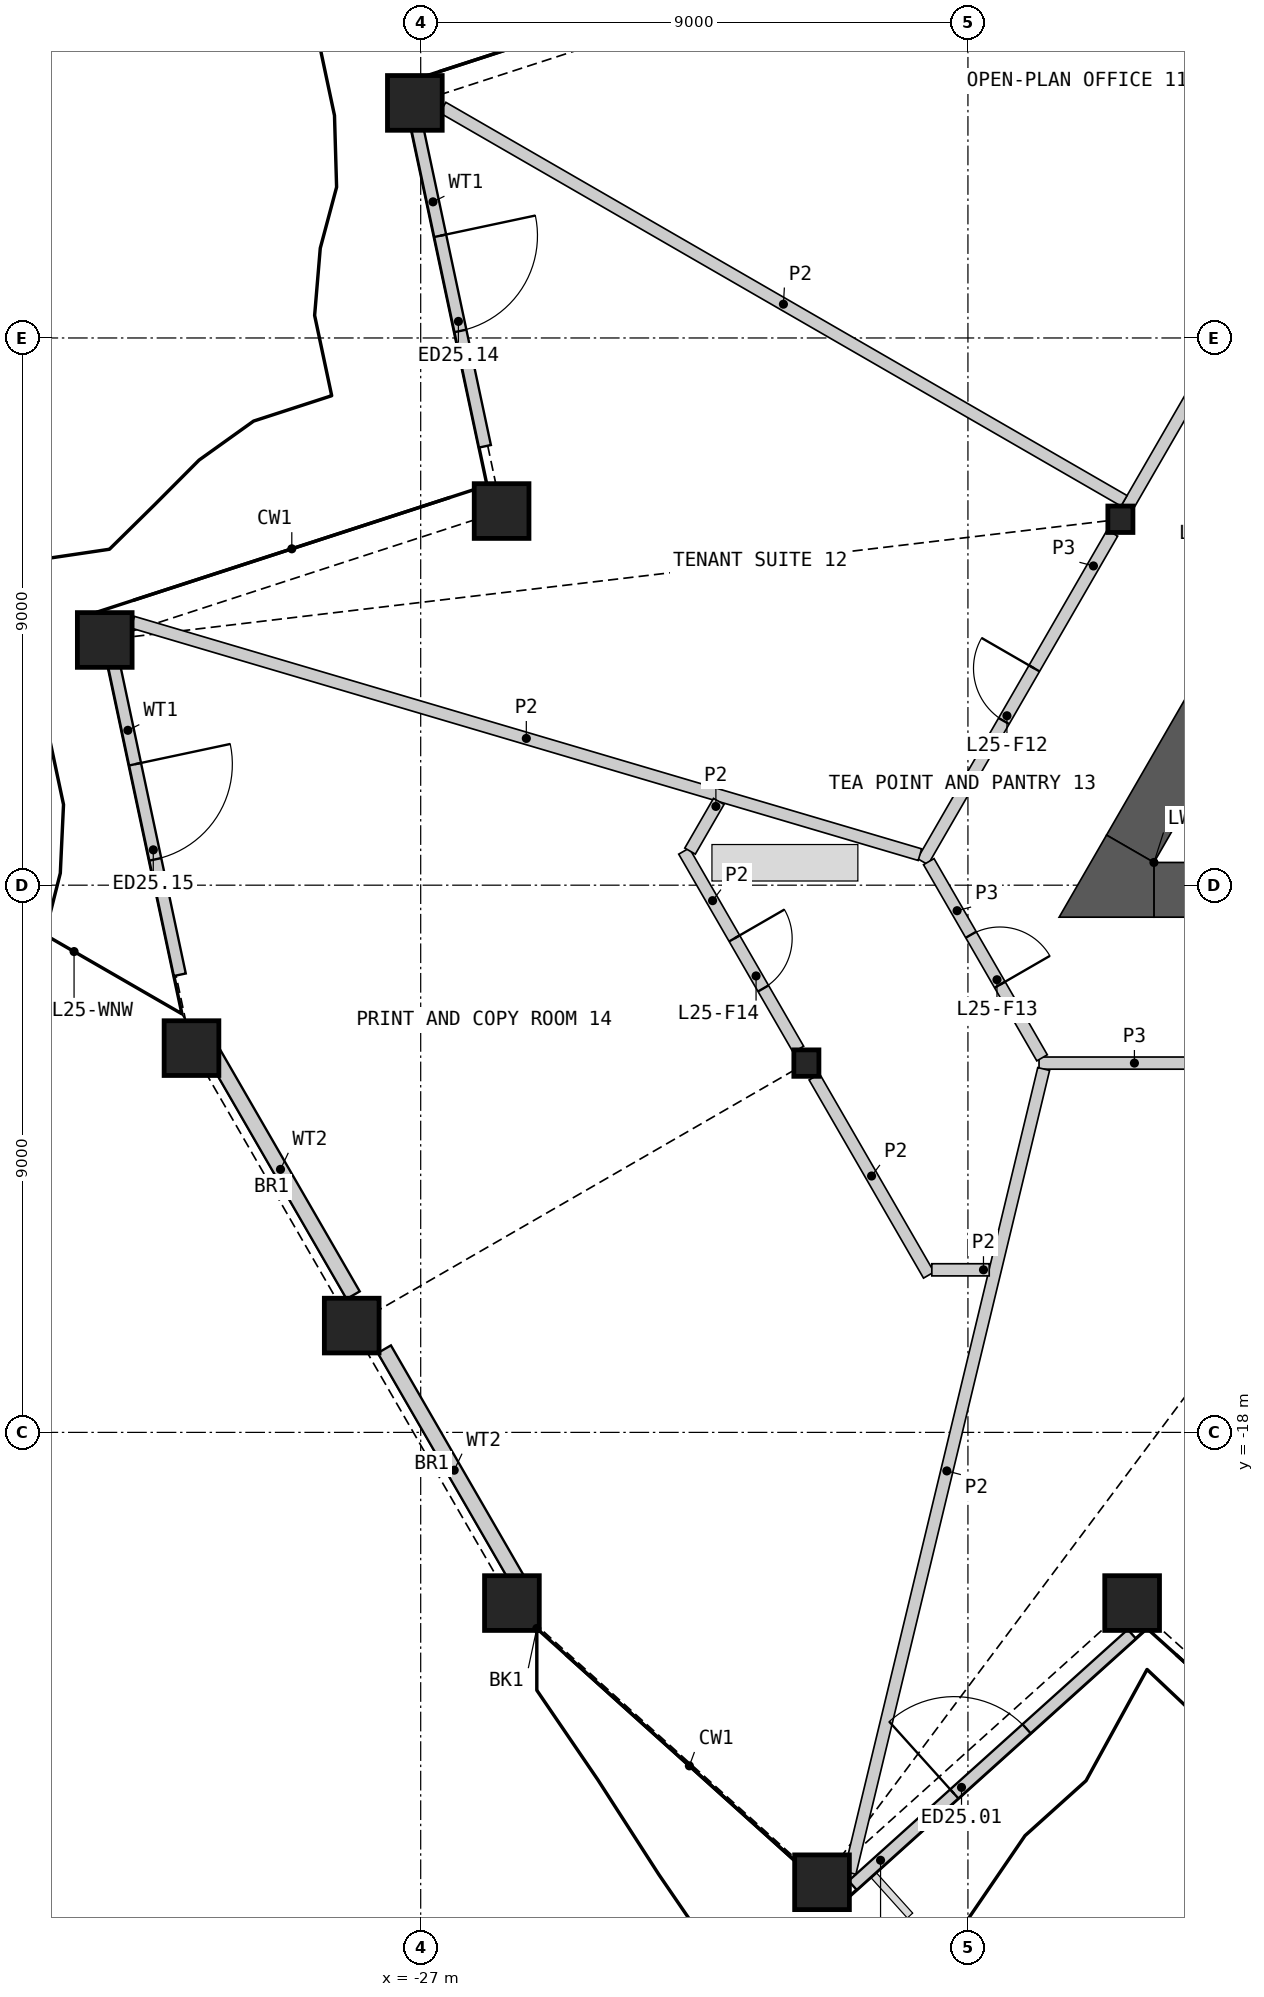
"""IFC4 building model, lengths in metres.
Left out: names, types, materials, properties, quantities, classifications, styles, units other than length and angle.
Written with IfcOpenShell. Run it as: python <this file> out.ifc"""

import sys

from ifc_helpers import new_model, si_unit, direction, frame, frame_2d, origin, origin_2d, place, context, subcontext, project, spatial, polyline, rectangle, hollow_rectangle, i_section, outline, extrude, element, fill, save


model = new_model("IFC4")
c1 = context("Model", 3, precision=1e-05, world=origin(), true_north=direction((0.0, 1.0)))
c2 = subcontext(c1, "Body", "Model", "MODEL_VIEW")
j1 = project(units=[si_unit("LENGTHUNIT", "METRE"), si_unit("PLANEANGLEUNIT", "RADIAN")], contexts=[c1])
p1 = place(None, origin())
s1 = spatial("IfcSite", under=j1, at=p1, CompositionType="ELEMENT")
p2 = place(p1, origin())
s2 = spatial("IfcBuilding", under=s1, at=p2, CompositionType="ELEMENT")
p3 = place(p2, frame((0.0, 0.0, 120.6)))
s3 = spatial("IfcBuildingStorey", under=s2, at=p3, CompositionType="ELEMENT", Elevation=120.6)
for number, where, z_axis, x_axis in (
    (1, (-25.5, -20.807, 0.0), (0.0, 0.0, 1.0), (1.0, 0.0, 0.0)),
    (2, (-20.4, -25.399, 0.0), (0.0, 0.0, 1.0), (1.0, 0.0, 0.0)),
    (3, (-15.3, -20.807, 0.0), (0.0, 0.0, 1.0), (1.0, 0.0, 0.0)),
    (4, (-27.096, 3.866, 0.0), (0.0, 0.0, 1.0), (1.0, 0.0, 0.0)),
    (5, (-25.669, -2.846, 0.0), (0.0, 0.0, 1.0), (1.0, 0.0, 0.0)),
    (6, (-32.196, -4.967, 0.0), (0.0, 0.0, 1.0), (1.0, 0.0, 0.0)),
    (7, (-30.769, -11.68, 0.0), (0.0, 0.0, 1.0), (1.0, 0.0, 0.0)),
    (8, (-28.135, -16.243, 0.0), (0.0, 0.0, 1.0), (1.0, 0.0, 0.0)),
):
    element("IfcColumn", number, at=place(p3, frame(where, z_axis=z_axis, x_axis=x_axis)), inside=s3, PredefinedType="COLUMN", context=c2, shape_type="SweptSolid", body=[
        extrude(hollow_rectangle(XDim=0.9, YDim=0.9, WallThickness=0.06, at=origin_2d()), origin(), (0.0, 0.0, 1.0), 4.2),
    ])
for number, where, z_axis, x_axis in (
    (9, (-15.493, -2.982, 0.0), (0.0, 0.0, 1.0), (1.0, 0.0, 0.0)),
    (10, (-20.657, -11.926, 0.0), (0.0, 0.0, 1.0), (1.0, 0.0, 0.0)),
):
    element("IfcColumn", number, at=place(p3, frame(where, z_axis=z_axis, x_axis=x_axis)), inside=s3, PredefinedType="COLUMN", context=c2, shape_type="SweptSolid", body=[
        extrude(i_section(OverallWidth=0.412, OverallDepth=0.435, WebThickness=0.036, FlangeThickness=0.057, at=origin_2d()), origin(), (0.0, 0.0, 1.0), 4.2),
    ])
p4 = place(p3, frame((-19.896, -25.451, 0.0), z_axis=(0.0, 0.0, 1.0), x_axis=(0.743162487272, 0.669110990428, 0.0)))
e11 = element("IfcWall", 11, at=p4, inside=s3, PredefinedType="SOLIDWALL", context=c2, shape_type="SweptSolid", body=[
    extrude(rectangle(XDim=6.178, YDim=0.2, at=frame_2d((3.089, 0.0))), origin(), (0.0, 0.0, 1.0), 3.189),
])
p5 = place(p4, frame((2.25, 0.0, 0.0)))
e12 = element("IfcOpeningElement", 12, at=p5, cuts=e11, PredefinedType="OPENING", context=c2, shape_type="SweptSolid", body=[
    extrude(rectangle(XDim=1.6, YDim=2.4, at=frame_2d((0.8, 1.2))), frame((0.0, 0.11, 0.0), z_axis=(0.0, -1.0, 0.0), x_axis=(1.0, 0.0, 0.0)), (0.0, 0.0, 1.0), 0.22),
])
p6 = place(p3, frame((-27.083, 3.579, 0.0), z_axis=(0.0, 0.0, 1.0), x_axis=(0.207898180805, -0.978150472278, 0.0)))
e13 = element("IfcWall", 13, at=p6, inside=s3, PredefinedType="SOLIDWALL", context=c2, shape_type="SweptSolid", body=[
    extrude(rectangle(XDim=5.48, YDim=0.2, at=frame_2d((2.74, 0.0))), origin(), (0.0, 0.0, 1.0), 3.189),
])
p7 = place(p6, frame((1.94, 0.0, 0.0)))
e14 = element("IfcOpeningElement", 14, at=p7, cuts=e13, PredefinedType="OPENING", context=c2, shape_type="SweptSolid", body=[
    extrude(rectangle(XDim=1.6, YDim=2.4, at=frame_2d((0.8, 1.2))), frame((0.0, 0.11, 0.0), z_axis=(0.0, -1.0, 0.0), x_axis=(1.0, 0.0, 0.0)), (0.0, 0.0, 1.0), 0.22),
])
p8 = place(p3, frame((-32.101, -5.113, 0.0), z_axis=(0.0, 0.0, 1.0), x_axis=(0.207949862117, -0.978139486395, 0.0)))
e15 = element("IfcWall", 15, at=p8, inside=s3, PredefinedType="SOLIDWALL", context=c2, shape_type="SweptSolid", body=[
    extrude(rectangle(XDim=5.48, YDim=0.2, at=frame_2d((2.74, 0.0))), origin(), (0.0, 0.0, 1.0), 3.189),
])
p9 = place(p8, frame((1.94, 0.0, 0.0)))
e16 = element("IfcOpeningElement", 16, at=p9, cuts=e15, PredefinedType="OPENING", context=c2, shape_type="SweptSolid", body=[
    extrude(rectangle(XDim=1.6, YDim=2.4, at=frame_2d((0.8, 1.2))), frame((0.0, 0.11, 0.0), z_axis=(0.0, -1.0, 0.0), x_axis=(1.0, 0.0, 0.0)), (0.0, 0.0, 1.0), 0.22),
])
p10 = place(p3, frame((-30.5, -11.604, 0.0), z_axis=(0.0, 0.0, 1.0), x_axis=(0.499984810975, -0.866034172995, 0.0)))
e17 = element("IfcWall", 17, at=p10, inside=s3, PredefinedType="SOLIDWALL", context=c2, shape_type="SweptSolid", body=[
    extrude(rectangle(XDim=4.78, YDim=0.25, at=frame_2d((2.39, 0.0))), origin(), (0.0, 0.0, 1.0), 3.189),
])
p11 = place(p3, frame((-27.598, -16.632, 0.0), z_axis=(0.0, 0.0, 1.0), x_axis=(0.500018268964, -0.866014855936, 0.0)))
e18 = element("IfcWall", 18, at=p11, inside=s3, PredefinedType="SOLIDWALL", context=c2, shape_type="SweptSolid", body=[
    extrude(rectangle(XDim=4.596, YDim=0.25, at=frame_2d((2.298, 0.0))), origin(), (0.0, 0.0, 1.0), 3.189),
])
p12 = place(p3, frame((-14.941, -9.076, 0.0), z_axis=(0.0, 0.0, 1.0), x_axis=(1.0, 0.0, 0.0)))
e19 = element("IfcWall", 19, at=p12, inside=s3, PredefinedType="SHEAR", context=c2, shape_type="SweptSolid", body=[
    extrude(rectangle(XDim=7.649, YDim=0.9, at=frame_2d((3.824, 0.0))), origin(), (0.0, 0.0, 1.0), 3.8),
])
p13 = place(p3, frame((-13.271, -4.833, 0.0), z_axis=(0.0, 0.0, 1.0), x_axis=(-0.499994272862, -0.866028710324, 0.0)))
e20 = element("IfcWall", 20, at=p13, inside=s3, PredefinedType="SHEAR", context=c2, shape_type="SweptSolid", body=[
    extrude(rectangle(XDim=4.121, YDim=0.9, at=frame_2d((2.06, 0.0))), origin(), (0.0, 0.0, 1.0), 3.8),
])
p14 = place(p3, origin())
e21 = element("IfcWall", 21, at=p14, inside=s3, PredefinedType="SHEAR", context=c2, shape_type="SweptSolid", body=[
    extrude(outline(polyline([(-14.941, -8.626), (-14.941, -9.526), (-16.5, -9.526), (-15.721, -8.176), (-14.941, -8.626)])), origin(), (0.0, 0.0, 1.0), 3.8),
])
p15 = place(p3, frame((-15.402, -2.823, 0.0), z_axis=(0.0, 0.0, 1.0), x_axis=(0.500023237168, 0.866011987384, 0.0)))
e22 = element("IfcWall", 22, at=p15, inside=s3, PredefinedType="PARTITIONING", context=c2, shape_type="SweptSolid", body=[
    extrude(rectangle(XDim=9.883, YDim=0.2, at=frame_2d((4.942, 0.0))), origin(), (0.0, 0.0, 1.0), 3.8),
])
p16 = place(p15, frame((4.492, 0.0, 0.0)))
e23 = element("IfcOpeningElement", 23, at=p16, cuts=e22, PredefinedType="OPENING", context=c2, shape_type="SweptSolid", body=[
    extrude(rectangle(XDim=1.0, YDim=2.1, at=frame_2d((0.5, 1.05))), frame((0.0, 0.11, 0.0), z_axis=(0.0, -1.0, 0.0), x_axis=(1.0, 0.0, 0.0)), (0.0, 0.0, 1.0), 0.22),
])
p17 = place(p3, frame((-16.831, -11.926, 0.0), z_axis=(0.0, 0.0, 1.0), x_axis=(1.0, 0.0, 0.0)))
e24 = element("IfcWall", 24, at=p17, inside=s3, PredefinedType="PARTITIONING", context=c2, shape_type="SweptSolid", body=[
    extrude(rectangle(XDim=6.275, YDim=0.2, at=frame_2d((3.137, 0.0))), origin(), (0.0, 0.0, 1.0), 3.8),
])
p18 = place(p17, frame((2.688, 0.0, 0.0)))
e25 = element("IfcOpeningElement", 25, at=p18, cuts=e24, PredefinedType="OPENING", context=c2, shape_type="SweptSolid", body=[
    extrude(rectangle(XDim=1.0, YDim=2.1, at=frame_2d((0.5, 1.05))), frame((0.0, 0.11, 0.0), z_axis=(0.0, -1.0, 0.0), x_axis=(1.0, 0.0, 0.0)), (0.0, 0.0, 1.0), 0.22),
])
p19 = place(p3, frame((-18.744, -8.613, 0.0), z_axis=(0.0, 0.0, 1.0), x_axis=(0.499997920671, 0.866026604282, 0.0)))
e26 = element("IfcWall", 26, at=p19, inside=s3, PredefinedType="PARTITIONING", context=c2, shape_type="SweptSolid", body=[
    extrude(rectangle(XDim=6.24, YDim=0.2, at=frame_2d((3.12, 0.0))), origin(), (0.0, 0.0, 1.0), 3.8),
])
p20 = place(p19, frame((2.67, 0.0, 0.0)))
e27 = element("IfcOpeningElement", 27, at=p20, cuts=e26, PredefinedType="OPENING", context=c2, shape_type="SweptSolid", body=[
    extrude(rectangle(XDim=1.0, YDim=2.1, at=frame_2d((0.5, 1.05))), frame((0.0, 0.11, 0.0), z_axis=(0.0, -1.0, 0.0), x_axis=(1.0, 0.0, 0.0)), (0.0, 0.0, 1.0), 0.22),
])
p21 = place(p3, frame((-18.644, -8.613, 0.0), z_axis=(0.0, 0.0, 1.0), x_axis=(0.499958791762, -0.866049194065, 0.0)))
e28 = element("IfcWall", 28, at=p21, inside=s3, PredefinedType="PARTITIONING", context=c2, shape_type="SweptSolid", body=[
    extrude(rectangle(XDim=3.726, YDim=0.2, at=frame_2d((1.863, 0.0))), origin(), (0.0, 0.0, 1.0), 3.8),
])
p22 = place(p21, frame((1.388, 0.0, 0.0)))
e29 = element("IfcOpeningElement", 29, at=p22, cuts=e28, PredefinedType="OPENING", context=c2, shape_type="SweptSolid", body=[
    extrude(rectangle(XDim=0.95, YDim=2.1, at=frame_2d((0.475, 1.05))), frame((0.0, 0.11, 0.0), z_axis=(0.0, -1.0, 0.0), x_axis=(1.0, 0.0, 0.0)), (0.0, 0.0, 1.0), 0.22),
])
p23 = place(p3, frame((-19.94, -25.244, 0.0), z_axis=(0.0, 0.0, 1.0), x_axis=(0.234226353532, 0.972182089586, 0.0)))
e30 = element("IfcWall", 30, at=p23, inside=s3, PredefinedType="PARTITIONING", context=c2, shape_type="SweptSolid", body=[
    extrude(rectangle(XDim=13.599, YDim=0.2, at=frame_2d((6.8, 0.0))), origin(), (0.0, 0.0, 1.0), 2.885),
])
p24 = place(p3, frame((-31.736, -4.675, 0.0), z_axis=(0.0, 0.0, 1.0), x_axis=(0.959053889024, -0.283223653581, 0.0)))
e31 = element("IfcWall", 31, at=p24, inside=s3, PredefinedType="PARTITIONING", context=c2, shape_type="SweptSolid", body=[
    extrude(rectangle(XDim=13.499, YDim=0.2, at=frame_2d((6.75, 0.0))), origin(), (0.0, 0.0, 1.0), 2.885),
])
p25 = place(p3, frame((-26.636, 3.79, 0.0), z_axis=(0.0, 0.0, 1.0), x_axis=(0.866029074283, -0.499993642455, 0.0)))
e32 = element("IfcWall", 32, at=p25, inside=s3, PredefinedType="PARTITIONING", context=c2, shape_type="SweptSolid", body=[
    extrude(rectangle(XDim=12.936, YDim=0.2, at=frame_2d((6.468, 0.0))), origin(), (0.0, 0.0, 1.0), 2.885),
])
p26 = place(p3, frame((-20.526, -12.154, 0.0), z_axis=(0.0, 0.0, 1.0), x_axis=(0.500046282919, -0.86599868068, 0.0)))
e33 = element("IfcWall", 33, at=p26, inside=s3, PredefinedType="PARTITIONING", context=c2, shape_type="SweptSolid", body=[
    extrude(rectangle(XDim=3.763, YDim=0.2, at=frame_2d((1.882, 0.0))), origin(), (0.0, 0.0, 1.0), 2.885),
])
p27 = place(p3, frame((-22.67, -8.44, 0.0), z_axis=(0.0, 0.0, 1.0), x_axis=(0.500018191375, -0.866014900734, 0.0)))
e34 = element("IfcWall", 34, at=p27, inside=s3, PredefinedType="PARTITIONING", context=c2, shape_type="SweptSolid", body=[
    extrude(rectangle(XDim=3.763, YDim=0.2, at=frame_2d((1.882, 0.0))), origin(), (0.0, 0.0, 1.0), 2.885),
])
p28 = place(p27, frame((1.658, 0.0, 0.0)))
e35 = element("IfcOpeningElement", 35, at=p28, cuts=e34, PredefinedType="OPENING", context=c2, shape_type="SweptSolid", body=[
    extrude(rectangle(XDim=0.95, YDim=2.1, at=frame_2d((0.475, 1.05))), frame((0.0, 0.11, 0.0), z_axis=(0.0, -1.0, 0.0), x_axis=(1.0, 0.0, 0.0)), (0.0, 0.0, 1.0), 0.22),
])
for number, where, z_axis, x_axis in (
    (36, (-18.594, -15.326, 0.0), (0.0, 0.0, 1.0), (1.0, 0.0, 0.0)),
    (37, (-22.57, -8.44, 0.0), (0.0, 0.0, 1.0), (0.5, 0.866, 0.0)),
):
    element("IfcWall", number, at=place(p3, frame(where, z_axis=z_axis, x_axis=x_axis)), inside=s3, PredefinedType="PARTITIONING", context=c2, shape_type="SweptSolid", body=[
        extrude(rectangle(XDim=0.944, YDim=0.2, at=frame_2d((0.472, 0.0))), origin(), (0.0, 0.0, 1.0), 2.885),
    ])
p29 = place(p5, origin())
e38 = element("IfcDoor", 38, at=p29, inside=s3, OperationType="DOUBLE_DOOR_SINGLE_SWING", PredefinedType="DOOR", context=c2, shape_type="SweptSolid", body=[
    extrude(rectangle(XDim=1.6, YDim=2.4, at=frame_2d((0.8, 1.2))), frame((0.0, 0.025, 0.0), z_axis=(0.0, -1.0, 0.0), x_axis=(1.0, 0.0, 0.0)), (0.0, 0.0, 1.0), 0.05),
])
fill(e12, e38)
p30 = place(p7, origin())
e39 = element("IfcDoor", 39, at=p30, inside=s3, OperationType="DOUBLE_DOOR_SINGLE_SWING", PredefinedType="DOOR", context=c2, shape_type="SweptSolid", body=[
    extrude(rectangle(XDim=1.6, YDim=2.4, at=frame_2d((0.8, 1.2))), frame((0.0, 0.025, 0.0), z_axis=(0.0, -1.0, 0.0), x_axis=(1.0, 0.0, 0.0)), (0.0, 0.0, 1.0), 0.05),
])
fill(e14, e39)
p31 = place(p9, origin())
e40 = element("IfcDoor", 40, at=p31, inside=s3, OperationType="DOUBLE_DOOR_SINGLE_SWING", PredefinedType="DOOR", context=c2, shape_type="SweptSolid", body=[
    extrude(rectangle(XDim=1.6, YDim=2.4, at=frame_2d((0.8, 1.2))), frame((0.0, 0.025, 0.0), z_axis=(0.0, -1.0, 0.0), x_axis=(1.0, 0.0, 0.0)), (0.0, 0.0, 1.0), 0.05),
])
fill(e16, e40)
p32 = place(p20, origin())
e41 = element("IfcDoor", 41, at=p32, inside=s3, OperationType="SINGLE_SWING_RIGHT", PredefinedType="DOOR", context=c2, shape_type="SweptSolid", body=[
    extrude(rectangle(XDim=1.0, YDim=2.1, at=frame_2d((0.5, 1.05))), frame((0.0, 0.025, 0.0), z_axis=(0.0, -1.0, 0.0), x_axis=(1.0, 0.0, 0.0)), (0.0, 0.0, 1.0), 0.05),
])
fill(e27, e41)
p33 = place(p22, origin())
e42 = element("IfcDoor", 42, at=p33, inside=s3, OperationType="SINGLE_SWING_RIGHT", PredefinedType="DOOR", context=c2, shape_type="SweptSolid", body=[
    extrude(rectangle(XDim=0.95, YDim=2.1, at=frame_2d((0.475, 1.05))), frame((0.0, 0.025, 0.0), z_axis=(0.0, -1.0, 0.0), x_axis=(1.0, 0.0, 0.0)), (0.0, 0.0, 1.0), 0.05),
])
fill(e29, e42)
p34 = place(p28, origin())
e43 = element("IfcDoor", 43, at=p34, inside=s3, OperationType="SINGLE_SWING_LEFT", PredefinedType="DOOR", context=c2, shape_type="SweptSolid", body=[
    extrude(rectangle(XDim=0.95, YDim=2.1, at=frame_2d((0.475, 1.05))), frame((0.0, 0.025, 0.0), z_axis=(0.0, -1.0, 0.0), x_axis=(1.0, 0.0, 0.0)), (0.0, 0.0, 1.0), 0.05),
])
fill(e35, e43)
save(model, sys.argv[1])
